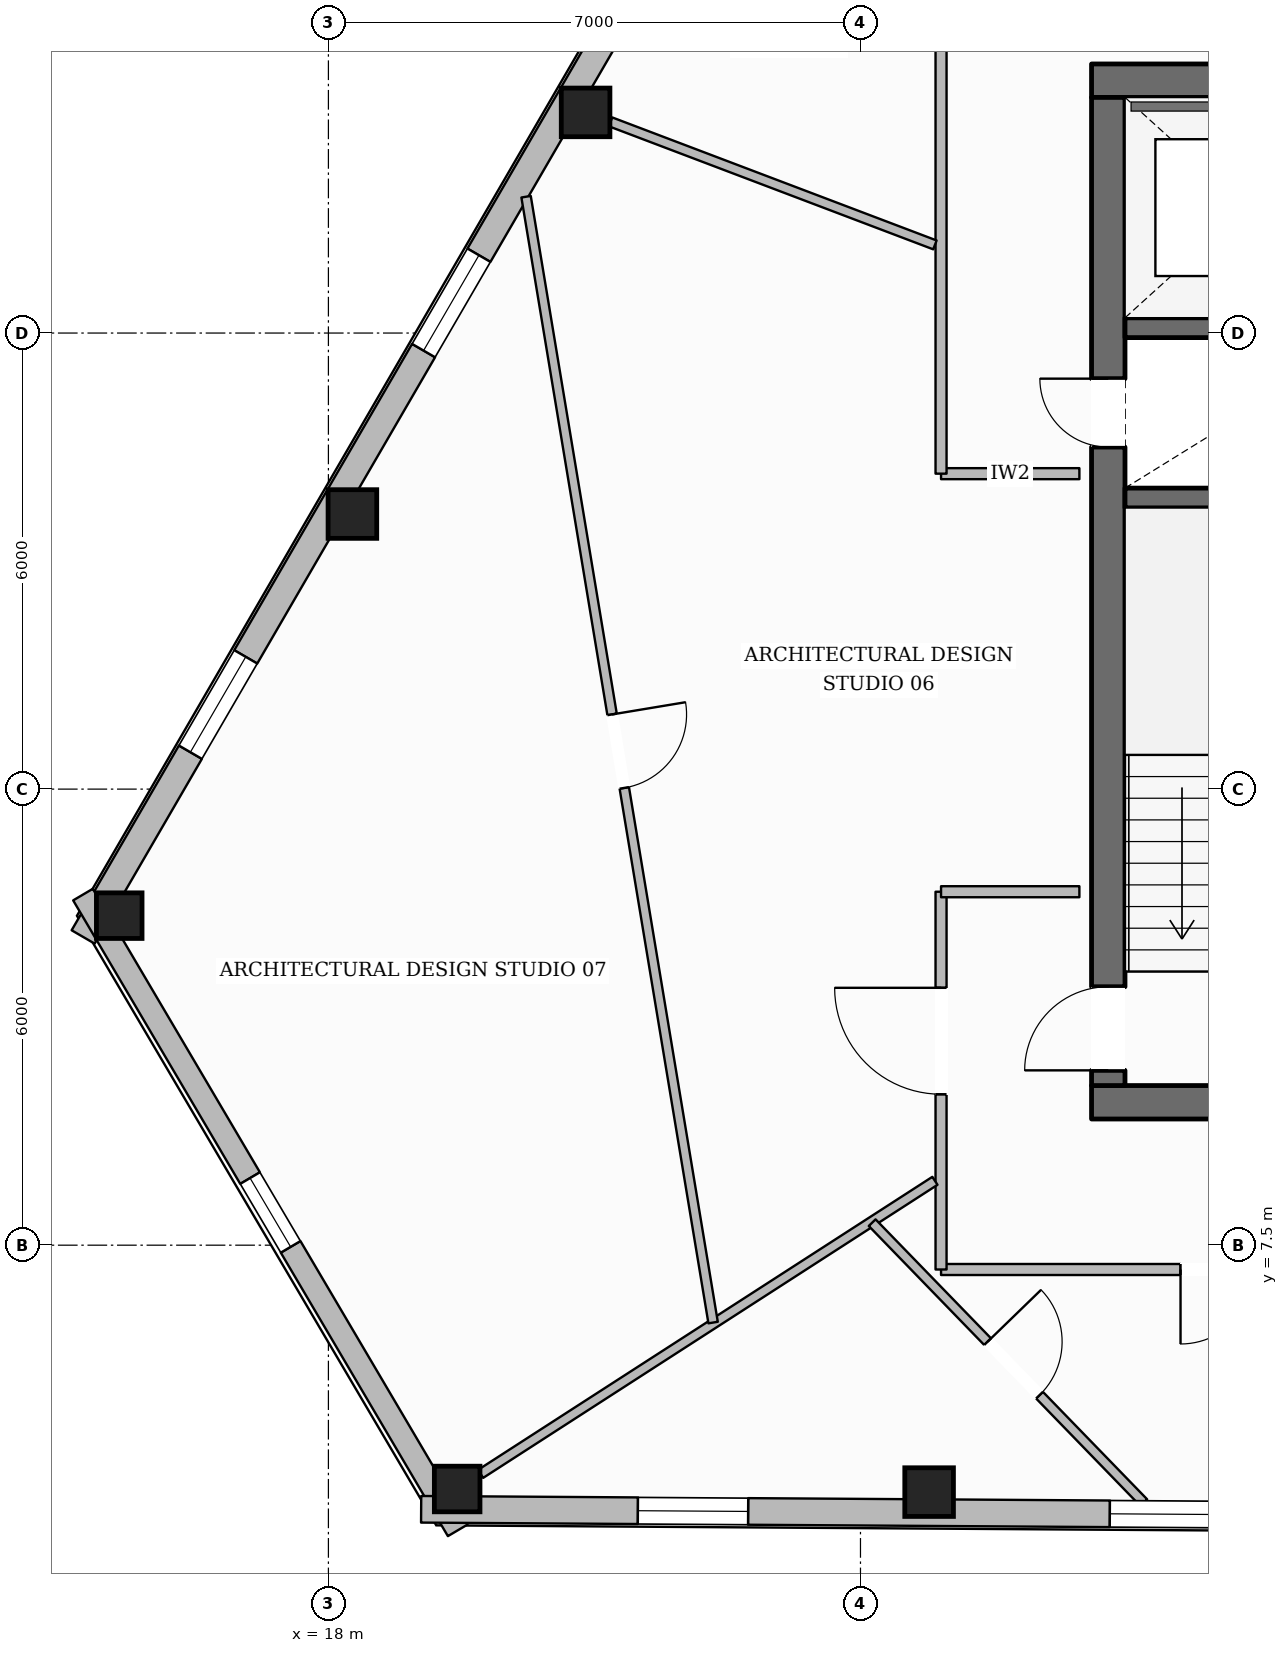
"""IFC4 building model, lengths in metres.
Left out: names, types, materials, properties, quantities, classifications, styles, units other than length and angle.
Written with IfcOpenShell. Run it as: python <this file> out.ifc"""

import sys

from ifc_helpers import new_model, si_unit, direction, frame, frame_2d, origin, origin_2d, place, context, subcontext, project, spatial, rectangle, hollow_rectangle, extrude, element, fill, save


model = new_model("IFC4")
c1 = context("Model", 3, precision=1e-05, world=origin(), true_north=direction((0.0, 1.0)))
c2 = subcontext(c1, "Body", "Model", "MODEL_VIEW")
j1 = project(units=[si_unit("LENGTHUNIT", "METRE"), si_unit("PLANEANGLEUNIT", "RADIAN")], contexts=[c1])
p1 = place(None, origin())
s1 = spatial("IfcSite", under=j1, at=p1, CompositionType="ELEMENT")
p2 = place(p1, origin())
s2 = spatial("IfcBuilding", under=s1, at=p2, CompositionType="ELEMENT")
p3 = place(p2, frame((0.0, 0.0, 195.8)))
s3 = spatial("IfcBuildingStorey", under=s2, at=p3, CompositionType="ELEMENT", Elevation=195.8)
p4 = place(p3, frame((28.04, 9.38, 0.0), z_axis=(0.0, 0.0, 1.0), x_axis=(1.0, 0.0, 0.0)))
e1 = element("IfcWall", 1, at=p4, inside=s3, PredefinedType="SOLIDWALL", context=c2, shape_type="SweptSolid", body=[
    extrude(rectangle(XDim=19.92, YDim=0.44, at=frame_2d((9.96, 0.0))), origin(), (0.0, 0.0, 1.0), 3.6),
])
p5 = place(p4, frame((10.46, 0.0, 0.0)))
e2 = element("IfcOpeningElement", 2, at=p5, cuts=e1, PredefinedType="OPENING", context=c2, shape_type="SweptSolid", body=[
    extrude(rectangle(XDim=1.4, YDim=2.2, at=frame_2d((0.7, 1.1))), frame((0.0, 0.23, 0.0), z_axis=(0.0, -1.0, 0.0), x_axis=(1.0, 0.0, 0.0)), (0.0, 0.0, 1.0), 0.46),
])
p6 = place(p3, frame((28.04, 22.82, 0.0), z_axis=(0.0, 0.0, 1.0), x_axis=(1.0, 0.0, 0.0)))
e3 = element("IfcWall", 3, at=p6, inside=s3, PredefinedType="SOLIDWALL", context=c2, shape_type="SweptSolid", body=[
    extrude(rectangle(XDim=19.92, YDim=0.44, at=frame_2d((9.96, 0.0))), origin(), (0.0, 0.0, 1.0), 3.6),
])
p7 = place(p6, frame((6.235, 0.0, 0.0)))
e4 = element("IfcOpeningElement", 4, at=p7, cuts=e3, PredefinedType="OPENING", context=c2, shape_type="SweptSolid", body=[
    extrude(rectangle(XDim=1.05, YDim=2.15, at=frame_2d((0.525, 1.075))), frame((0.0, 0.23, 0.0), z_axis=(0.0, -1.0, 0.0), x_axis=(1.0, 0.0, 0.0)), (0.0, 0.0, 1.0), 0.46),
])
p8 = place(p6, frame((12.635, 0.0, 0.0)))
e5 = element("IfcOpeningElement", 5, at=p8, cuts=e3, PredefinedType="OPENING", context=c2, shape_type="SweptSolid", body=[
    extrude(rectangle(XDim=1.05, YDim=2.15, at=frame_2d((0.525, 1.075))), frame((0.0, 0.23, 0.0), z_axis=(0.0, -1.0, 0.0), x_axis=(1.0, 0.0, 0.0)), (0.0, 0.0, 1.0), 0.46),
])
p9 = place(p3, frame((28.26, 9.6, 0.0), z_axis=(0.0, 0.0, 1.0), x_axis=(0.0, 1.0, 0.0)))
e6 = element("IfcWall", 6, at=p9, inside=s3, PredefinedType="SOLIDWALL", context=c2, shape_type="SweptSolid", body=[
    extrude(rectangle(XDim=13.0, YDim=0.44, at=frame_2d((6.5, 0.0))), origin(), (0.0, 0.0, 1.0), 3.6),
])
p10 = place(p9, frame((0.2, 0.0, 0.0)))
e7 = element("IfcOpeningElement", 7, at=p10, cuts=e6, PredefinedType="OPENING", context=c2, shape_type="SweptSolid", body=[
    extrude(rectangle(XDim=1.1, YDim=2.15, at=frame_2d((0.55, 1.075))), frame((0.0, 0.23, 0.0), z_axis=(0.0, -1.0, 0.0), x_axis=(1.0, 0.0, 0.0)), (0.0, 0.0, 1.0), 0.46),
])
p11 = place(p9, frame((8.4, 0.0, 0.0)))
e8 = element("IfcOpeningElement", 8, at=p11, cuts=e6, PredefinedType="OPENING", context=c2, shape_type="SweptSolid", body=[
    extrude(rectangle(XDim=0.9, YDim=2.1, at=frame_2d((0.45, 1.05))), frame((0.0, 0.23, 0.0), z_axis=(0.0, -1.0, 0.0), x_axis=(1.0, 0.0, 0.0)), (0.0, 0.0, 1.0), 0.46),
])
for number, where, z_axis, x_axis in (
    (9, (28.48, 17.33, 0.0), (0.0, 0.0, 1.0), (1.0, 0.0, 0.0)),
    (10, (28.48, 19.57, 0.0), (0.0, 0.0, 1.0), (1.0, 0.0, 0.0)),
):
    element("IfcWall", number, at=place(p3, frame(where, z_axis=z_axis, x_axis=x_axis)), inside=s3, PredefinedType="SHEAR", context=c2, shape_type="SweptSolid", body=[
        extrude(rectangle(XDim=3.2, YDim=0.26, at=frame_2d((1.6, 0.0))), origin(), (0.0, 0.0, 1.0), 3.6),
    ])
for number, where, z_axis, x_axis in (
    (11, (21.384, 22.403, 0.0), (0.0, 0.0, 1.0), (1.0, 0.0, 0.0)),
    (12, (18.316, 17.119, 0.0), (0.0, 0.0, 1.0), (1.0, 0.0, 0.0)),
):
    element("IfcColumn", number, at=place(p3, frame(where, z_axis=z_axis, x_axis=x_axis)), inside=s3, PredefinedType="COLUMN", context=c2, shape_type="SweptSolid", body=[
        extrude(hollow_rectangle(XDim=0.64, YDim=0.64, WallThickness=0.028, at=origin_2d()), origin(), (0.0, 0.0, 1.0), 3.6),
    ])
for number, where, z_axis, x_axis in (
    (13, (15.248, 11.835, 0.0), (0.0, 0.0, 1.0), (1.0, 0.0, 0.0)),
    (14, (19.694, 4.292, 0.0), (0.0, 0.0, 1.0), (1.0, 0.0, 0.0)),
):
    element("IfcColumn", number, at=place(p3, frame(where, z_axis=z_axis, x_axis=x_axis)), inside=s3, PredefinedType="COLUMN", context=c2, shape_type="SweptSolid", body=[
        extrude(hollow_rectangle(XDim=0.6, YDim=0.6, WallThickness=0.028, at=origin_2d()), origin(), (0.0, 0.0, 1.0), 3.6),
    ])
p12 = place(p3, frame((25.903, 4.251, 0.0), z_axis=(0.0, 0.0, 1.0), x_axis=(1.0, 0.0, 0.0)))
e15 = element("IfcColumn", 15, at=p12, inside=s3, PredefinedType="COLUMN", context=c2, shape_type="SweptSolid", body=[
    extrude(hollow_rectangle(XDim=0.64, YDim=0.64, WallThickness=0.028, at=origin_2d()), origin(), (0.0, 0.0, 1.0), 3.6),
])
p13 = place(p3, frame((14.773, 11.555, 0.0), z_axis=(0.0, 0.0, 1.0), x_axis=(0.502113441051, 0.864801764751, 0.0)))
e16 = element("IfcWall", 16, at=p13, inside=s3, PredefinedType="STANDARD", context=c2, shape_type="SweptSolid", body=[
    extrude(rectangle(XDim=37.618, YDim=0.35, at=frame_2d((18.809, 0.0))), origin(), (0.0, 0.0, 1.0), 3.132),
])
p14 = place(p13, frame((33.36, 0.0, 0.65)))
e17 = element("IfcOpeningElement", 17, at=p14, cuts=e16, PredefinedType="OPENING", context=c2, shape_type="SweptSolid", body=[
    extrude(rectangle(XDim=1.45, YDim=1.75, at=frame_2d((0.725, 0.875))), frame((0.0, 0.185, 0.0), z_axis=(0.0, -1.0, 0.0), x_axis=(1.0, 0.0, 0.0)), (0.0, 0.0, 1.0), 0.37),
])
p15 = place(p13, frame((27.25, 0.0, 0.65)))
e18 = element("IfcOpeningElement", 18, at=p15, cuts=e16, PredefinedType="OPENING", context=c2, shape_type="SweptSolid", body=[
    extrude(rectangle(XDim=1.45, YDim=1.75, at=frame_2d((0.725, 0.875))), frame((0.0, 0.185, 0.0), z_axis=(0.0, -1.0, 0.0), x_axis=(1.0, 0.0, 0.0)), (0.0, 0.0, 1.0), 0.37),
])
p16 = place(p13, frame((15.03, 0.0, 0.65)))
e19 = element("IfcOpeningElement", 19, at=p16, cuts=e16, PredefinedType="OPENING", context=c2, shape_type="SweptSolid", body=[
    extrude(rectangle(XDim=1.45, YDim=1.75, at=frame_2d((0.725, 0.875))), frame((0.0, 0.185, 0.0), z_axis=(0.0, -1.0, 0.0), x_axis=(1.0, 0.0, 0.0)), (0.0, 0.0, 1.0), 0.37),
])
p17 = place(p13, frame((8.92, 0.0, 0.65)))
e20 = element("IfcOpeningElement", 20, at=p17, cuts=e16, PredefinedType="OPENING", context=c2, shape_type="SweptSolid", body=[
    extrude(rectangle(XDim=1.45, YDim=1.75, at=frame_2d((0.725, 0.875))), frame((0.0, 0.185, 0.0), z_axis=(0.0, -1.0, 0.0), x_axis=(1.0, 0.0, 0.0)), (0.0, 0.0, 1.0), 0.37),
])
p18 = place(p13, frame((2.811, 0.0, 0.65)))
e21 = element("IfcOpeningElement", 21, at=p18, cuts=e16, PredefinedType="OPENING", context=c2, shape_type="SweptSolid", body=[
    extrude(rectangle(XDim=1.45, YDim=1.75, at=frame_2d((0.725, 0.875))), frame((0.0, 0.185, 0.0), z_axis=(0.0, -1.0, 0.0), x_axis=(1.0, 0.0, 0.0)), (0.0, 0.0, 1.0), 0.37),
])
p19 = place(p3, frame((19.701, 3.748, 0.0), z_axis=(0.0, 0.0, 1.0), x_axis=(-0.507779296433, 0.861487194399, 0.0)))
e22 = element("IfcWall", 22, at=p19, inside=s3, PredefinedType="STANDARD", context=c2, shape_type="SweptSolid", body=[
    extrude(rectangle(XDim=9.709, YDim=0.3, at=frame_2d((4.854, 0.0))), origin(), (0.0, 0.0, 1.0), 3.132),
])
p20 = place(p19, frame((4.329, 0.0, 0.65)))
e23 = element("IfcOpeningElement", 23, at=p20, cuts=e22, PredefinedType="OPENING", context=c2, shape_type="SweptSolid", body=[
    extrude(rectangle(XDim=1.05, YDim=1.7, at=frame_2d((0.525, 0.85))), frame((0.0, 0.16, 0.0), z_axis=(0.0, -1.0, 0.0), x_axis=(1.0, 0.0, 0.0)), (0.0, 0.0, 1.0), 0.32),
])
p21 = place(p3, frame((57.425, 3.775, 0.0), z_axis=(0.0, 0.0, 1.0), x_axis=(-0.99997846495, 0.006562746083, 0.0)))
e24 = element("IfcWall", 24, at=p21, inside=s3, PredefinedType="STANDARD", context=c2, shape_type="SweptSolid", body=[
    extrude(rectangle(XDim=38.205, YDim=0.35, at=frame_2d((19.103, 0.0))), origin(), (0.0, 0.0, 1.0), 3.132),
])
p22 = place(p21, frame((33.904, 0.0, 0.65)))
e25 = element("IfcOpeningElement", 25, at=p22, cuts=e24, PredefinedType="OPENING", context=c2, shape_type="SweptSolid", body=[
    extrude(rectangle(XDim=1.45, YDim=1.75, at=frame_2d((0.725, 0.875))), frame((0.0, 0.185, 0.0), z_axis=(0.0, -1.0, 0.0), x_axis=(1.0, 0.0, 0.0)), (0.0, 0.0, 1.0), 0.37),
])
p23 = place(p21, frame((27.695, 0.0, 0.65)))
e26 = element("IfcOpeningElement", 26, at=p23, cuts=e24, PredefinedType="OPENING", context=c2, shape_type="SweptSolid", body=[
    extrude(rectangle(XDim=1.45, YDim=1.75, at=frame_2d((0.725, 0.875))), frame((0.0, 0.185, 0.0), z_axis=(0.0, -1.0, 0.0), x_axis=(1.0, 0.0, 0.0)), (0.0, 0.0, 1.0), 0.37),
])
p24 = place(p21, frame((15.276, 0.0, 0.65)))
e27 = element("IfcOpeningElement", 27, at=p24, cuts=e24, PredefinedType="OPENING", context=c2, shape_type="SweptSolid", body=[
    extrude(rectangle(XDim=1.45, YDim=1.75, at=frame_2d((0.725, 0.875))), frame((0.0, 0.185, 0.0), z_axis=(0.0, -1.0, 0.0), x_axis=(1.0, 0.0, 0.0)), (0.0, 0.0, 1.0), 0.37),
])
p25 = place(p21, frame((9.067, 0.0, 0.65)))
e28 = element("IfcOpeningElement", 28, at=p25, cuts=e24, PredefinedType="OPENING", context=c2, shape_type="SweptSolid", body=[
    extrude(rectangle(XDim=1.45, YDim=1.75, at=frame_2d((0.725, 0.875))), frame((0.0, 0.185, 0.0), z_axis=(0.0, -1.0, 0.0), x_axis=(1.0, 0.0, 0.0)), (0.0, 0.0, 1.0), 0.37),
])
p26 = place(p21, frame((2.858, 0.0, 0.65)))
e29 = element("IfcOpeningElement", 29, at=p26, cuts=e24, PredefinedType="OPENING", context=c2, shape_type="SweptSolid", body=[
    extrude(rectangle(XDim=1.45, YDim=1.75, at=frame_2d((0.725, 0.875))), frame((0.0, 0.185, 0.0), z_axis=(0.0, -1.0, 0.0), x_axis=(1.0, 0.0, 0.0)), (0.0, 0.0, 1.0), 0.37),
])
p27 = place(p3, frame((27.88, 17.65, 0.0), z_axis=(0.0, 0.0, 1.0), x_axis=(-1.0, 0.0, 0.0)))
e30 = element("IfcWall", 30, at=p27, inside=s3, PredefinedType="PARTITIONING", context=c2, shape_type="SweptSolid", body=[
    extrude(rectangle(XDim=1.82, YDim=0.145, at=frame_2d((0.91, 0.0))), origin(), (0.0, 0.0, 1.0), 3.6),
])
p28 = place(p3, frame((26.06, 17.65, 0.0), z_axis=(0.0, 0.0, 1.0), x_axis=(0.0, 1.0, 0.0)))
e31 = element("IfcWall", 31, at=p28, inside=s3, PredefinedType="PARTITIONING", context=c2, shape_type="SweptSolid", body=[
    extrude(rectangle(XDim=7.37, YDim=0.145, at=frame_2d((3.685, 0.0))), origin(), (0.0, 0.0, 1.0), 3.339),
])
p29 = place(p3, frame((49.94, 7.18, 0.0), z_axis=(0.0, 0.0, 1.0), x_axis=(-1.0, 0.0, 0.0)))
e32 = element("IfcWall", 32, at=p29, inside=s3, PredefinedType="PARTITIONING", context=c2, shape_type="SweptSolid", body=[
    extrude(rectangle(XDim=23.88, YDim=0.145, at=frame_2d((11.94, 0.0))), origin(), (0.0, 0.0, 1.0), 3.6),
])
p30 = place(p29, frame((19.749, 0.0, 0.0)))
e33 = element("IfcOpeningElement", 33, at=p30, cuts=e32, PredefinedType="OPENING", context=c2, shape_type="SweptSolid", body=[
    extrude(rectangle(XDim=0.98, YDim=2.15, at=frame_2d((0.49, 1.075))), frame((0.0, 0.083, 0.0), z_axis=(0.0, -1.0, 0.0), x_axis=(1.0, 0.0, 0.0)), (0.0, 0.0, 1.0), 0.165),
])
p31 = place(p29, frame((8.929, 0.0, 0.0)))
e34 = element("IfcOpeningElement", 34, at=p31, cuts=e32, PredefinedType="OPENING", context=c2, shape_type="SweptSolid", body=[
    extrude(rectangle(XDim=1.02, YDim=2.15, at=frame_2d((0.51, 1.075))), frame((0.0, 0.083, 0.0), z_axis=(0.0, -1.0, 0.0), x_axis=(1.0, 0.0, 0.0)), (0.0, 0.0, 1.0), 0.165),
])
p32 = place(p3, frame((26.06, 7.18, 0.0), z_axis=(0.0, 0.0, 1.0), x_axis=(0.0, 1.0, 0.0)))
e35 = element("IfcWall", 35, at=p32, inside=s3, PredefinedType="PARTITIONING", context=c2, shape_type="SweptSolid", body=[
    extrude(rectangle(XDim=4.97, YDim=0.145, at=frame_2d((2.485, 0.0))), origin(), (0.0, 0.0, 1.0), 3.6),
])
p33 = place(p32, frame((2.306, 0.0, 0.0)))
e36 = element("IfcOpeningElement", 36, at=p33, cuts=e35, PredefinedType="OPENING", context=c2, shape_type="SweptSolid", body=[
    extrude(rectangle(XDim=1.4, YDim=2.2, at=frame_2d((0.7, 1.1))), frame((0.0, 0.083, 0.0), z_axis=(0.0, -1.0, 0.0), x_axis=(1.0, 0.0, 0.0)), (0.0, 0.0, 1.0), 0.165),
])
p34 = place(p3, frame((26.06, 12.15, 0.0), z_axis=(0.0, 0.0, 1.0), x_axis=(1.0, 0.0, 0.0)))
e37 = element("IfcWall", 37, at=p34, inside=s3, PredefinedType="PARTITIONING", context=c2, shape_type="SweptSolid", body=[
    extrude(rectangle(XDim=1.82, YDim=0.145, at=frame_2d((0.91, 0.0))), origin(), (0.0, 0.0, 1.0), 3.6),
])
p35 = place(p3, frame((25.979, 20.66, 0.0), z_axis=(0.0, 0.0, 1.0), x_axis=(-0.935010369313, 0.354620373465, 0.0)))
e38 = element("IfcWall", 38, at=p35, inside=s3, PredefinedType="PARTITIONING", context=c2, shape_type="SweptSolid", body=[
    extrude(rectangle(XDim=4.564, YDim=0.125, at=frame_2d((2.282, 0.0))), origin(), (0.0, 0.0, 1.0), 3.6),
])
p36 = place(p3, frame((25.979, 8.347, 0.0), z_axis=(0.0, 0.0, 1.0), x_axis=(-0.840345568486, -0.542051035905, 0.0)))
e39 = element("IfcWall", 39, at=p36, inside=s3, PredefinedType="PARTITIONING", context=c2, shape_type="SweptSolid", body=[
    extrude(rectangle(XDim=7.113, YDim=0.125, at=frame_2d((3.557, 0.0))), origin(), (0.0, 0.0, 1.0), 3.141),
])
p37 = place(p3, frame((20.601, 21.293, 0.0), z_axis=(0.0, 0.0, 1.0), x_axis=(0.163887425382, -0.986479047827, 0.0)))
e40 = element("IfcWall", 40, at=p37, inside=s3, PredefinedType="PARTITIONING", context=c2, shape_type="SweptSolid", body=[
    extrude(rectangle(XDim=15.015, YDim=0.125, at=frame_2d((7.507, 0.0))), origin(), (0.0, 0.0, 1.0), 3.339),
])
p38 = place(p37, frame((6.904, 0.0, 0.0)))
e41 = element("IfcOpeningElement", 41, at=p38, cuts=e40, PredefinedType="OPENING", context=c2, shape_type="SweptSolid", body=[
    extrude(rectangle(XDim=0.98, YDim=2.15, at=frame_2d((0.49, 1.075))), frame((0.0, 0.073, 0.0), z_axis=(0.0, -1.0, 0.0), x_axis=(1.0, 0.0, 0.0)), (0.0, 0.0, 1.0), 0.145),
])
p39 = place(p3, frame((25.154, 7.796, 0.0), z_axis=(0.0, 0.0, 1.0), x_axis=(0.696321168486, -0.717730332589, 0.0)))
e42 = element("IfcWall", 42, at=p39, inside=s3, PredefinedType="PARTITIONING", context=c2, shape_type="SweptSolid", body=[
    extrude(rectangle(XDim=5.132, YDim=0.125, at=frame_2d((2.566, 0.0))), origin(), (0.0, 0.0, 1.0), 3.6),
])
p40 = place(p39, frame((2.181, 0.0, 0.0)))
e43 = element("IfcOpeningElement", 43, at=p40, cuts=e42, PredefinedType="OPENING", context=c2, shape_type="SweptSolid", body=[
    extrude(rectangle(XDim=0.98, YDim=2.15, at=frame_2d((0.49, 1.075))), frame((0.0, 0.073, 0.0), z_axis=(0.0, -1.0, 0.0), x_axis=(1.0, 0.0, 0.0)), (0.0, 0.0, 1.0), 0.145),
])
p41 = place(p17, origin())
e44 = element("IfcWindow", 44, at=p41, inside=s3, PartitioningType="SINGLE_PANEL", PredefinedType="WINDOW", context=c2, shape_type="SweptSolid", body=[
    extrude(rectangle(XDim=1.45, YDim=1.75, at=frame_2d((0.725, 0.875))), frame((0.0, 0.03, 0.0), z_axis=(0.0, -1.0, 0.0), x_axis=(1.0, 0.0, 0.0)), (0.0, 0.0, 1.0), 0.06),
])
fill(e20, e44)
p42 = place(p18, origin())
e45 = element("IfcWindow", 45, at=p42, inside=s3, PartitioningType="SINGLE_PANEL", PredefinedType="WINDOW", context=c2, shape_type="SweptSolid", body=[
    extrude(rectangle(XDim=1.45, YDim=1.75, at=frame_2d((0.725, 0.875))), frame((0.0, 0.03, 0.0), z_axis=(0.0, -1.0, 0.0), x_axis=(1.0, 0.0, 0.0)), (0.0, 0.0, 1.0), 0.06),
])
fill(e21, e45)
p43 = place(p22, origin())
e46 = element("IfcWindow", 46, at=p43, inside=s3, PartitioningType="SINGLE_PANEL", PredefinedType="WINDOW", context=c2, shape_type="SweptSolid", body=[
    extrude(rectangle(XDim=1.45, YDim=1.75, at=frame_2d((0.725, 0.875))), frame((0.0, 0.03, 0.0), z_axis=(0.0, -1.0, 0.0), x_axis=(1.0, 0.0, 0.0)), (0.0, 0.0, 1.0), 0.06),
])
fill(e25, e46)
p44 = place(p23, origin())
e47 = element("IfcWindow", 47, at=p44, inside=s3, PartitioningType="SINGLE_PANEL", PredefinedType="WINDOW", context=c2, shape_type="SweptSolid", body=[
    extrude(rectangle(XDim=1.45, YDim=1.75, at=frame_2d((0.725, 0.875))), frame((0.0, 0.03, 0.0), z_axis=(0.0, -1.0, 0.0), x_axis=(1.0, 0.0, 0.0)), (0.0, 0.0, 1.0), 0.06),
])
fill(e26, e47)
p45 = place(p20, origin())
e48 = element("IfcWindow", 48, at=p45, inside=s3, PartitioningType="SINGLE_PANEL", PredefinedType="WINDOW", context=c2, shape_type="SweptSolid", body=[
    extrude(rectangle(XDim=1.05, YDim=1.7, at=frame_2d((0.525, 0.85))), frame((0.0, 0.03, 0.0), z_axis=(0.0, -1.0, 0.0), x_axis=(1.0, 0.0, 0.0)), (0.0, 0.0, 1.0), 0.06),
])
fill(e23, e48)
p46 = place(p10, origin())
e49 = element("IfcDoor", 49, at=p46, inside=s3, OperationType="SINGLE_SWING_LEFT", PredefinedType="DOOR", context=c2, shape_type="SweptSolid", body=[
    extrude(rectangle(XDim=1.1, YDim=2.15, at=frame_2d((0.55, 1.075))), frame((0.0, 0.025, 0.0), z_axis=(0.0, -1.0, 0.0), x_axis=(1.0, 0.0, 0.0)), (0.0, 0.0, 1.0), 0.05),
])
fill(e7, e49)
p47 = place(p11, origin())
e50 = element("IfcDoor", 50, at=p47, inside=s3, OperationType="SINGLE_SWING_RIGHT", PredefinedType="DOOR", context=c2, shape_type="SweptSolid", body=[
    extrude(rectangle(XDim=0.9, YDim=2.1, at=frame_2d((0.45, 1.05))), frame((0.0, 0.025, 0.0), z_axis=(0.0, -1.0, 0.0), x_axis=(1.0, 0.0, 0.0)), (0.0, 0.0, 1.0), 0.05),
])
fill(e8, e50)
p48 = place(p33, origin())
e51 = element("IfcDoor", 51, at=p48, inside=s3, OperationType="SINGLE_SWING_RIGHT", PredefinedType="DOOR", context=c2, shape_type="SweptSolid", body=[
    extrude(rectangle(XDim=1.4, YDim=2.2, at=frame_2d((0.7, 1.1))), frame((0.0, 0.025, 0.0), z_axis=(0.0, -1.0, 0.0), x_axis=(1.0, 0.0, 0.0)), (0.0, 0.0, 1.0), 0.05),
])
fill(e36, e51)
p49 = place(p38, origin())
e52 = element("IfcDoor", 52, at=p49, inside=s3, OperationType="SINGLE_SWING_LEFT", PredefinedType="DOOR", context=c2, shape_type="SweptSolid", body=[
    extrude(rectangle(XDim=0.98, YDim=2.15, at=frame_2d((0.49, 1.075))), frame((0.0, 0.025, 0.0), z_axis=(0.0, -1.0, 0.0), x_axis=(1.0, 0.0, 0.0)), (0.0, 0.0, 1.0), 0.05),
])
fill(e41, e52)
p50 = place(p30, origin())
e53 = element("IfcDoor", 53, at=p50, inside=s3, OperationType="SINGLE_SWING_RIGHT", PredefinedType="DOOR", context=c2, shape_type="SweptSolid", body=[
    extrude(rectangle(XDim=0.98, YDim=2.15, at=frame_2d((0.49, 1.075))), frame((0.0, 0.025, 0.0), z_axis=(0.0, -1.0, 0.0), x_axis=(1.0, 0.0, 0.0)), (0.0, 0.0, 1.0), 0.05),
])
fill(e33, e53)
p51 = place(p40, origin())
e54 = element("IfcDoor", 54, at=p51, inside=s3, OperationType="SINGLE_SWING_LEFT", PredefinedType="DOOR", context=c2, shape_type="SweptSolid", body=[
    extrude(rectangle(XDim=0.98, YDim=2.15, at=frame_2d((0.49, 1.075))), frame((0.0, 0.025, 0.0), z_axis=(0.0, -1.0, 0.0), x_axis=(1.0, 0.0, 0.0)), (0.0, 0.0, 1.0), 0.05),
])
fill(e43, e54)
save(model, sys.argv[1])
